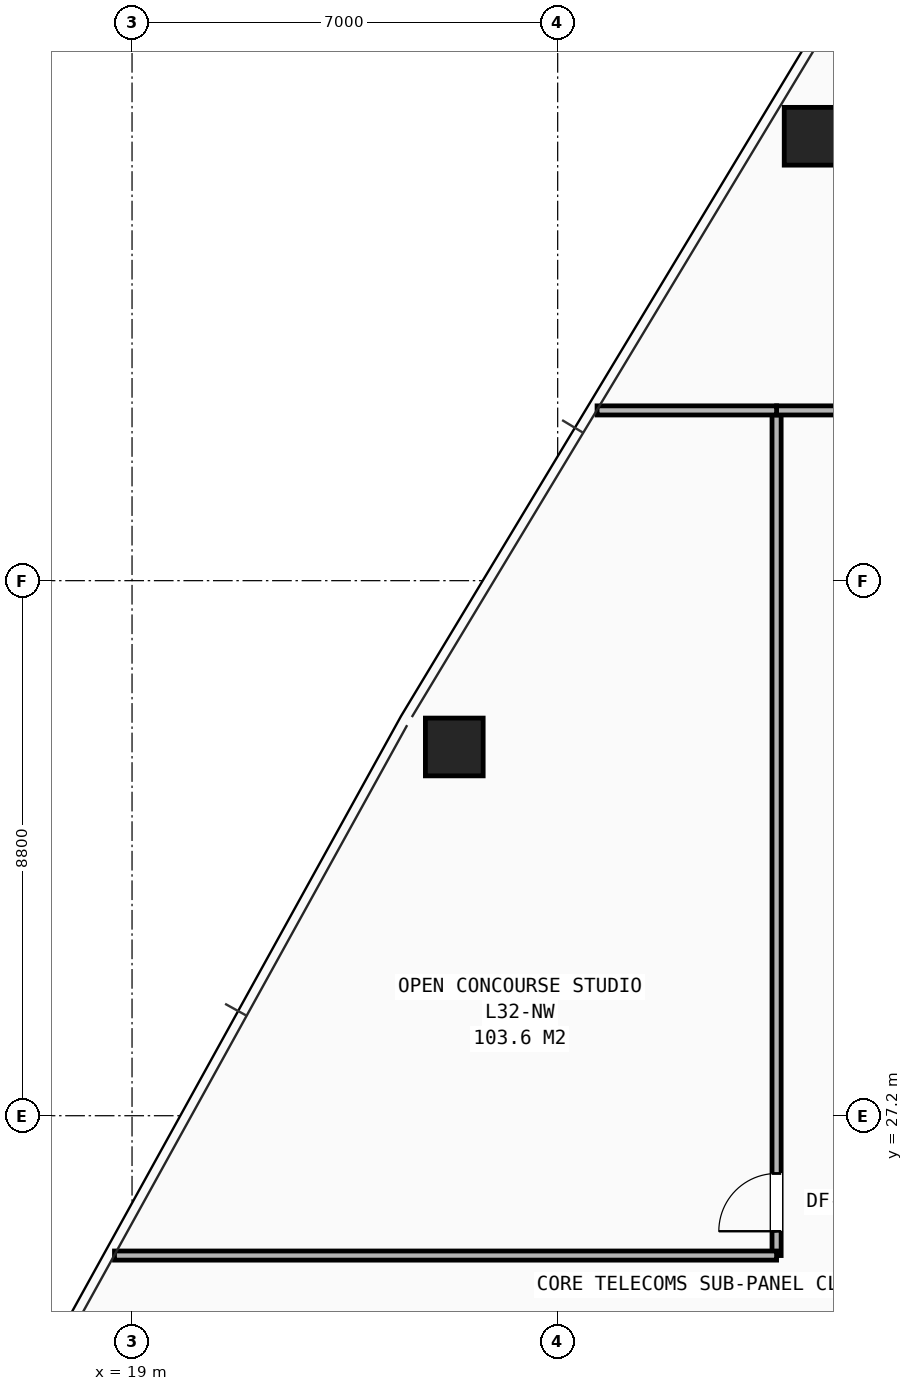
"""IFC4 building model, lengths in metres.
Left out: names, types, materials, properties, quantities, classifications, styles, units other than length and angle.
Written with IfcOpenShell. Run it as: python <this file> out.ifc"""

import sys

from ifc_helpers import new_model, si_unit, direction, frame, frame_2d, origin, origin_2d, place, context, subcontext, project, spatial, rectangle, hollow_rectangle, extrude, element, fill, save


model = new_model("IFC4")
c1 = context("Model", 3, precision=1e-05, world=origin(), true_north=direction((0.0, 1.0)))
c2 = subcontext(c1, "Body", "Model", "MODEL_VIEW")
j1 = project(units=[si_unit("LENGTHUNIT", "METRE"), si_unit("PLANEANGLEUNIT", "RADIAN")], contexts=[c1])
p1 = place(None, origin())
s1 = spatial("IfcSite", under=j1, at=p1, CompositionType="ELEMENT")
p2 = place(p1, origin())
s2 = spatial("IfcBuilding", under=s1, at=p2, CompositionType="ELEMENT")
p3 = place(p2, frame((0.0, 0.0, 111.8)))
s3 = spatial("IfcBuildingStorey", under=s2, at=p3, CompositionType="ELEMENT", Elevation=111.8)
for number, where, z_axis, x_axis in (
    (1, (30.201, 43.309, 0.0), (0.0, 0.0, 1.0), (1.0, 0.0, 0.0)),
    (2, (24.3, 33.265, 0.0), (0.0, 0.0, 1.0), (1.0, 0.0, 0.0)),
):
    element("IfcColumn", number, at=place(p3, frame(where, z_axis=z_axis, x_axis=x_axis)), inside=s3, PredefinedType="COLUMN", context=c2, shape_type="SweptSolid", body=[
        extrude(hollow_rectangle(XDim=0.95, YDim=0.95, WallThickness=0.065, at=origin_2d()), origin(), (0.0, 0.0, 1.0), 4.2),
    ])
p4 = place(p3, frame((29.6, 24.9, 0.0), z_axis=(0.0, 0.0, 1.0), x_axis=(0.0, 1.0, 0.0)))
e3 = element("IfcWall", 3, at=p4, inside=s3, PredefinedType="PARTITIONING", context=c2, shape_type="SweptSolid", body=[
    extrude(rectangle(XDim=13.9, YDim=0.15, at=frame_2d((6.95, 0.0))), origin(), (0.0, 0.0, 1.0), 2.975),
])
p5 = place(p4, frame((0.4, 0.0, 0.0)))
e4 = element("IfcOpeningElement", 4, at=p5, cuts=e3, PredefinedType="OPENING", context=c2, shape_type="SweptSolid", body=[
    extrude(rectangle(XDim=0.95, YDim=2.1, at=frame_2d((0.475, 1.05))), frame((0.0, 0.085, 0.0), z_axis=(0.0, -1.0, 0.0), x_axis=(1.0, 0.0, 0.0)), (0.0, 0.0, 1.0), 0.17),
])
p6 = place(p3, frame((29.6, 38.8, 0.0), z_axis=(0.0, 0.0, 1.0), x_axis=(1.0, 0.0, 0.0)))
e5 = element("IfcWall", 5, at=p6, inside=s3, PredefinedType="PARTITIONING", context=c2, shape_type="SweptSolid", body=[
    extrude(rectangle(XDim=2.2, YDim=0.15, at=frame_2d((1.1, 0.0))), origin(), (0.0, 0.0, 1.0), 3.493),
])
p7 = place(p3, frame((18.711, 24.9, 0.0), z_axis=(0.0, 0.0, 1.0), x_axis=(1.0, 0.0, 0.0)))
e6 = element("IfcWall", 6, at=p7, inside=s3, PredefinedType="PARTITIONING", context=c2, shape_type="SweptSolid", body=[
    extrude(rectangle(XDim=10.889, YDim=0.15, at=frame_2d((5.444, 0.0))), origin(), (0.0, 0.0, 1.0), 3.248),
])
p8 = place(p3, frame((26.648, 38.8, 0.0), z_axis=(0.0, 0.0, 1.0), x_axis=(1.0, 0.0, 0.0)))
e7 = element("IfcWall", 7, at=p8, inside=s3, PredefinedType="PARTITIONING", context=c2, shape_type="SweptSolid", body=[
    extrude(rectangle(XDim=2.952, YDim=0.15, at=frame_2d((1.476, 0.0))), origin(), (0.0, 0.0, 1.0), 3.248),
])
p9 = place(p5, origin())
e8 = element("IfcDoor", 8, at=p9, inside=s3, OperationType="SINGLE_SWING_LEFT", PredefinedType="DOOR", context=c2, shape_type="SweptSolid", body=[
    extrude(rectangle(XDim=0.95, YDim=2.1, at=frame_2d((0.475, 1.05))), frame((0.0, 0.025, 0.0), z_axis=(0.0, -1.0, 0.0), x_axis=(1.0, 0.0, 0.0)), (0.0, 0.0, 1.0), 0.05),
])
fill(e4, e8)
save(model, sys.argv[1])
